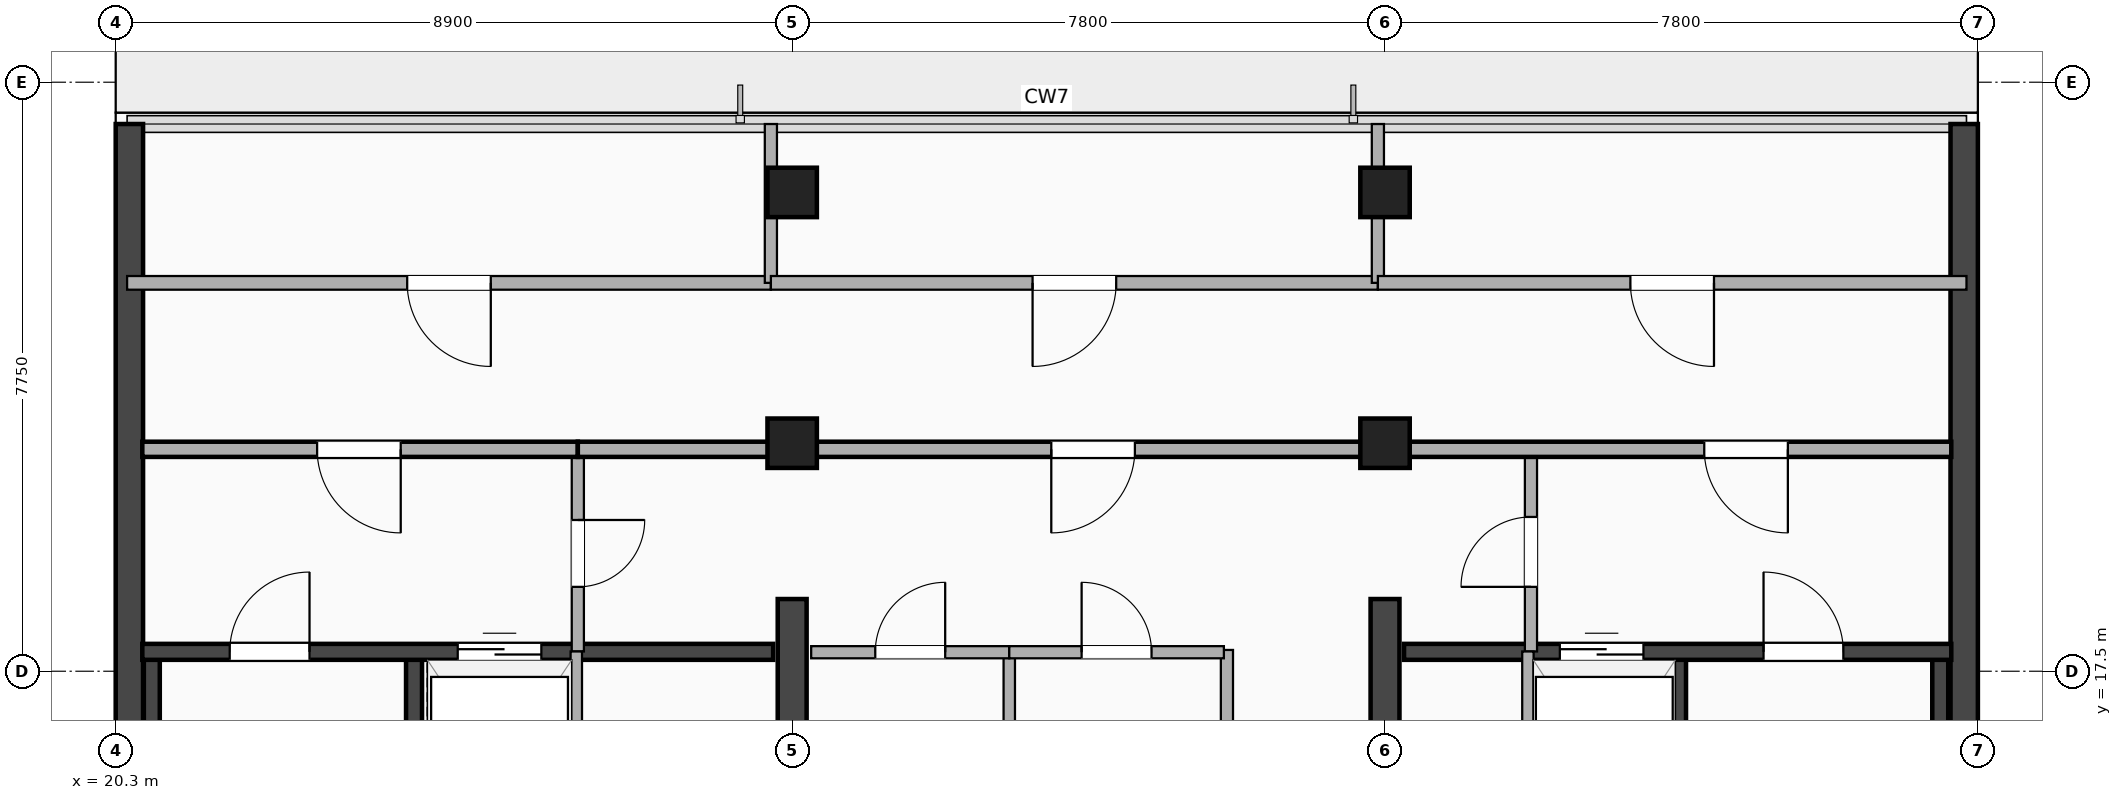
"""IFC4 building model, lengths in metres.
Left out: names, types, materials, properties, quantities, classifications, styles, units other than length and angle.
Written with IfcOpenShell. Run it as: python <this file> out.ifc"""

import sys

from ifc_helpers import new_model, si_unit, direction, frame, frame_2d, origin, origin_2d, place, context, subcontext, project, spatial, rectangle, extrude, element, fill, save


model = new_model("IFC4")
c1 = context("Model", 3, precision=1e-05, world=origin(), true_north=direction((0.0, 1.0)))
c2 = subcontext(c1, "Body", "Model", "MODEL_VIEW")
j1 = project(units=[si_unit("LENGTHUNIT", "METRE"), si_unit("PLANEANGLEUNIT", "RADIAN")], contexts=[c1])
p1 = place(None, origin())
s1 = spatial("IfcSite", under=j1, at=p1, CompositionType="ELEMENT")
p2 = place(p1, origin())
s2 = spatial("IfcBuilding", under=s1, at=p2, CompositionType="ELEMENT")
p3 = place(p2, frame((0.0, 0.0, 312.5)))
s3 = spatial("IfcBuildingStorey", under=s2, at=p3, CompositionType="ELEMENT", Elevation=312.5)
for number, where, z_axis, x_axis in (
    (1, (20.48, 3.5, 0.0), (0.0, 0.0, 1.0), (0.0, 1.0, 0.0)),
    (2, (44.62, 3.5, 0.0), (0.0, 0.0, 1.0), (0.0, 1.0, 0.0)),
):
    element("IfcWall", number, at=place(p3, frame(where, z_axis=z_axis, x_axis=x_axis)), inside=s3, PredefinedType="SHEAR", context=c2, shape_type="SweptSolid", body=[
        extrude(rectangle(XDim=21.2, YDim=0.36, at=frame_2d((10.6, 0.0))), origin(), (0.0, 0.0, 1.0), 4.3),
    ])
p4 = place(p3, frame((29.2, 3.5, 0.0), z_axis=(0.0, 0.0, 1.0), x_axis=(0.0, 1.0, 0.0)))
e3 = element("IfcWall", 3, at=p4, inside=s3, PredefinedType="SHEAR", context=c2, shape_type="SweptSolid", body=[
    extrude(rectangle(XDim=14.95, YDim=0.38, at=frame_2d((7.475, 0.0))), origin(), (0.0, 0.0, 1.0), 4.3),
])
p5 = place(p4, frame((7.75, 0.0, 0.0), z_axis=(0.0, 0.0, 1.0), x_axis=(-1.0, 0.0, 0.0)))
e4 = element("IfcOpeningElement", 4, at=p5, cuts=e3, PredefinedType="OPENING", context=c2, shape_type="SweptSolid", body=[
    extrude(rectangle(XDim=1.1, YDim=2.15, at=frame_2d((0.55, 1.075))), frame((0.0, 0.2, 0.0), z_axis=(0.0, -1.0, 0.0), x_axis=(1.0, 0.0, 0.0)), (0.0, 0.0, 1.0), 0.4),
])
p6 = place(p3, frame((37.0, 3.5, 0.0), z_axis=(0.0, 0.0, 1.0), x_axis=(0.0, 1.0, 0.0)))
e5 = element("IfcWall", 5, at=p6, inside=s3, PredefinedType="SHEAR", context=c2, shape_type="SweptSolid", body=[
    extrude(rectangle(XDim=14.95, YDim=0.38, at=frame_2d((7.475, 0.0))), origin(), (0.0, 0.0, 1.0), 4.3),
])
p7 = place(p6, frame((6.65, 0.0, 0.0)))
e6 = element("IfcOpeningElement", 6, at=p7, cuts=e5, PredefinedType="OPENING", context=c2, shape_type="SweptSolid", body=[
    extrude(rectangle(XDim=1.1, YDim=2.15, at=frame_2d((0.55, 1.075))), frame((0.0, 0.2, 0.0), z_axis=(0.0, -1.0, 0.0), x_axis=(1.0, 0.0, 0.0)), (0.0, 0.0, 1.0), 0.4),
])
for number, where, z_axis, x_axis in (
    (7, (20.775, 9.745, 0.0), (0.0, 0.0, 1.0), (0.0, 1.0, 0.0)),
    (8, (24.225, 9.745, 0.0), (0.0, 0.0, 1.0), (0.0, 1.0, 0.0)),
):
    element("IfcWall", number, at=place(p3, frame(where, z_axis=z_axis, x_axis=x_axis)), inside=s3, PredefinedType="SHEAR", context=c2, shape_type="SweptSolid", body=[
        extrude(rectangle(XDim=8.01, YDim=0.21, at=frame_2d((4.005, 0.0))), origin(), (0.0, 0.0, 1.0), 4.3),
    ])
p8 = place(p3, frame((20.65, 17.755, 0.0), z_axis=(0.0, 0.0, 1.0), x_axis=(1.0, 0.0, 0.0)))
e9 = element("IfcWall", 9, at=p8, inside=s3, PredefinedType="SHEAR", context=c2, shape_type="SweptSolid", body=[
    extrude(rectangle(XDim=8.3, YDim=0.21, at=frame_2d((4.15, 0.0))), origin(), (0.0, 0.0, 1.0), 4.3),
])
p9 = place(p8, frame((2.2, 0.0, 0.0), z_axis=(0.0, 0.0, 1.0), x_axis=(-1.0, 0.0, 0.0)))
e10 = element("IfcOpeningElement", 10, at=p9, cuts=e9, PredefinedType="OPENING", context=c2, shape_type="SweptSolid", body=[
    extrude(rectangle(XDim=1.05, YDim=2.15, at=frame_2d((0.525, 1.075))), frame((0.0, 0.115, 0.0), z_axis=(0.0, -1.0, 0.0), x_axis=(1.0, 0.0, 0.0)), (0.0, 0.0, 1.0), 0.23),
])
p10 = place(p8, frame((4.15, 0.0, 0.0)))
e11 = element("IfcOpeningElement", 11, at=p10, cuts=e9, PredefinedType="OPENING", context=c2, shape_type="SweptSolid", body=[
    extrude(rectangle(XDim=1.1, YDim=2.18, at=frame_2d((0.55, 1.09))), frame((0.0, 0.115, 0.0), z_axis=(0.0, -1.0, 0.0), x_axis=(1.0, 0.0, 0.0)), (0.0, 0.0, 1.0), 0.23),
])
for number, where, z_axis, x_axis in (
    (12, (40.855, 9.745, 0.0), (0.0, 0.0, 1.0), (0.0, 1.0, 0.0)),
    (13, (44.305, 9.745, 0.0), (0.0, 0.0, 1.0), (0.0, 1.0, 0.0)),
):
    element("IfcWall", number, at=place(p3, frame(where, z_axis=z_axis, x_axis=x_axis)), inside=s3, PredefinedType="SHEAR", context=c2, shape_type="SweptSolid", body=[
        extrude(rectangle(XDim=8.01, YDim=0.21, at=frame_2d((4.005, 0.0))), origin(), (0.0, 0.0, 1.0), 4.3),
    ])
p11 = place(p3, frame((37.25, 17.755, 0.0), z_axis=(0.0, 0.0, 1.0), x_axis=(1.0, 0.0, 0.0)))
e14 = element("IfcWall", 14, at=p11, inside=s3, PredefinedType="SHEAR", context=c2, shape_type="SweptSolid", body=[
    extrude(rectangle(XDim=7.2, YDim=0.21, at=frame_2d((3.6, 0.0))), origin(), (0.0, 0.0, 1.0), 4.3),
])
p12 = place(p11, frame((2.05, 0.0, 0.0)))
e15 = element("IfcOpeningElement", 15, at=p12, cuts=e14, PredefinedType="OPENING", context=c2, shape_type="SweptSolid", body=[
    extrude(rectangle(XDim=1.1, YDim=2.18, at=frame_2d((0.55, 1.09))), frame((0.0, 0.115, 0.0), z_axis=(0.0, -1.0, 0.0), x_axis=(1.0, 0.0, 0.0)), (0.0, 0.0, 1.0), 0.23),
])
p13 = place(p11, frame((5.78, 0.0, 0.0), z_axis=(0.0, 0.0, 1.0), x_axis=(-1.0, 0.0, 0.0)))
e16 = element("IfcOpeningElement", 16, at=p13, cuts=e14, PredefinedType="OPENING", context=c2, shape_type="SweptSolid", body=[
    extrude(rectangle(XDim=1.05, YDim=2.15, at=frame_2d((0.525, 1.075))), frame((0.0, 0.115, 0.0), z_axis=(0.0, -1.0, 0.0), x_axis=(1.0, 0.0, 0.0)), (0.0, 0.0, 1.0), 0.23),
])
for number, where, z_axis, x_axis in (
    (17, (29.2, 20.5, -0.3), (0.0, 0.0, 1.0), (1.0, 0.0, 0.0)),
    (18, (37.0, 20.5, -0.3), (0.0, 0.0, 1.0), (1.0, 0.0, 0.0)),
    (19, (29.2, 23.8, -0.3), (0.0, 0.0, 1.0), (1.0, 0.0, 0.0)),
    (20, (37.0, 23.8, -0.3), (0.0, 0.0, 1.0), (1.0, 0.0, 0.0)),
):
    element("IfcColumn", number, at=place(p3, frame(where, z_axis=z_axis, x_axis=x_axis)), inside=s3, PredefinedType="COLUMN", context=c2, shape_type="SweptSolid", body=[
        extrude(rectangle(XDim=0.65, YDim=0.65, at=origin_2d()), origin(), (0.0, 0.0, 1.0), 4.6),
    ])
p14 = place(p3, frame((26.38, 17.76, 0.0), z_axis=(0.0, 0.0, 1.0), x_axis=(0.0, 1.0, 0.0)))
e21 = element("IfcWall", 21, at=p14, inside=s3, PredefinedType="PARTITIONING", context=c2, shape_type="SweptSolid", body=[
    extrude(rectangle(XDim=2.66, YDim=0.16, at=frame_2d((1.33, 0.0))), origin(), (0.0, 0.0, 1.0), 4.3),
])
p15 = place(p14, frame((0.85, 0.0, 0.0)))
e22 = element("IfcOpeningElement", 22, at=p15, cuts=e21, PredefinedType="OPENING", context=c2, shape_type="SweptSolid", body=[
    extrude(rectangle(XDim=0.88, YDim=2.08, at=frame_2d((0.44, 1.04))), frame((0.0, 0.09, 0.0), z_axis=(0.0, -1.0, 0.0), x_axis=(1.0, 0.0, 0.0)), (0.0, 0.0, 1.0), 0.18),
])
p16 = place(p3, frame((38.92, 17.76, 0.0), z_axis=(0.0, 0.0, 1.0), x_axis=(0.0, 1.0, 0.0)))
e23 = element("IfcWall", 23, at=p16, inside=s3, PredefinedType="PARTITIONING", context=c2, shape_type="SweptSolid", body=[
    extrude(rectangle(XDim=2.66, YDim=0.16, at=frame_2d((1.33, 0.0))), origin(), (0.0, 0.0, 1.0), 4.3),
])
p17 = place(p16, frame((1.77, 0.0, 0.0), z_axis=(0.0, 0.0, 1.0), x_axis=(-1.0, 0.0, 0.0)))
e24 = element("IfcOpeningElement", 24, at=p17, cuts=e23, PredefinedType="OPENING", context=c2, shape_type="SweptSolid", body=[
    extrude(rectangle(XDim=0.92, YDim=2.08, at=frame_2d((0.46, 1.04))), frame((0.0, 0.09, 0.0), z_axis=(0.0, -1.0, 0.0), x_axis=(1.0, 0.0, 0.0)), (0.0, 0.0, 1.0), 0.18),
])
for number, where, z_axis, x_axis in (
    (25, (26.36, 14.72, 0.0), (0.0, 0.0, 1.0), (0.0, 1.0, 0.0)),
    (26, (38.88, 14.72, 0.0), (0.0, 0.0, 1.0), (0.0, 1.0, 0.0)),
):
    element("IfcWall", number, at=place(p3, frame(where, z_axis=z_axis, x_axis=x_axis)), inside=s3, PredefinedType="PARTITIONING", context=c2, shape_type="SweptSolid", body=[
        extrude(rectangle(XDim=3.04, YDim=0.15, at=frame_2d((1.52, 0.0))), origin(), (0.0, 0.0, 1.0), 4.3),
    ])
p18 = place(p3, frame((20.65, 20.42, 0.0), z_axis=(0.0, 0.0, 1.0), x_axis=(1.0, 0.0, 0.0)))
e27 = element("IfcWall", 27, at=p18, inside=s3, PredefinedType="PARTITIONING", context=c2, shape_type="SweptSolid", body=[
    extrude(rectangle(XDim=5.73, YDim=0.2, at=frame_2d((2.865, 0.0))), origin(), (0.0, 0.0, 1.0), 4.3),
])
p19 = place(p18, frame((2.3, 0.0, 0.0)))
e28 = element("IfcOpeningElement", 28, at=p19, cuts=e27, PredefinedType="OPENING", context=c2, shape_type="SweptSolid", body=[
    extrude(rectangle(XDim=1.1, YDim=2.15, at=frame_2d((0.55, 1.075))), frame((0.0, 0.11, 0.0), z_axis=(0.0, -1.0, 0.0), x_axis=(1.0, 0.0, 0.0)), (0.0, 0.0, 1.0), 0.22),
])
p20 = place(p3, frame((26.38, 20.42, 0.0), z_axis=(0.0, 0.0, 1.0), x_axis=(1.0, 0.0, 0.0)))
e29 = element("IfcWall", 29, at=p20, inside=s3, PredefinedType="PARTITIONING", context=c2, shape_type="SweptSolid", body=[
    extrude(rectangle(XDim=2.82, YDim=0.2, at=frame_2d((1.41, 0.0))), origin(), (0.0, 0.0, 1.0), 3.885),
])
p21 = place(p3, frame((29.2, 20.42, 0.0), z_axis=(0.0, 0.0, 1.0), x_axis=(1.0, 0.0, 0.0)))
e30 = element("IfcWall", 30, at=p21, inside=s3, PredefinedType="PARTITIONING", context=c2, shape_type="SweptSolid", body=[
    extrude(rectangle(XDim=7.8, YDim=0.2, at=frame_2d((3.9, 0.0))), origin(), (0.0, 0.0, 1.0), 3.885),
])
p22 = place(p21, frame((3.409, 0.0, 0.0)))
e31 = element("IfcOpeningElement", 31, at=p22, cuts=e30, PredefinedType="OPENING", context=c2, shape_type="SweptSolid", body=[
    extrude(rectangle(XDim=1.1, YDim=2.15, at=frame_2d((0.55, 1.075))), frame((0.0, 0.11, 0.0), z_axis=(0.0, -1.0, 0.0), x_axis=(1.0, 0.0, 0.0)), (0.0, 0.0, 1.0), 0.22),
])
p23 = place(p3, frame((37.0, 20.42, 0.0), z_axis=(0.0, 0.0, 1.0), x_axis=(1.0, 0.0, 0.0)))
e32 = element("IfcWall", 32, at=p23, inside=s3, PredefinedType="PARTITIONING", context=c2, shape_type="SweptSolid", body=[
    extrude(rectangle(XDim=7.45, YDim=0.2, at=frame_2d((3.725, 0.0))), origin(), (0.0, 0.0, 1.0), 3.885),
])
p24 = place(p23, frame((4.2, 0.0, 0.0)))
e33 = element("IfcOpeningElement", 33, at=p24, cuts=e32, PredefinedType="OPENING", context=c2, shape_type="SweptSolid", body=[
    extrude(rectangle(XDim=1.1, YDim=2.15, at=frame_2d((0.55, 1.075))), frame((0.0, 0.11, 0.0), z_axis=(0.0, -1.0, 0.0), x_axis=(1.0, 0.0, 0.0)), (0.0, 0.0, 1.0), 0.22),
])
p25 = place(p3, frame((34.92, 11.68, 0.0), z_axis=(0.0, 0.0, 1.0), x_axis=(0.0, 1.0, 0.0)))
e34 = element("IfcWall", 34, at=p25, inside=s3, PredefinedType="PARTITIONING", context=c2, shape_type="SweptSolid", body=[
    extrude(rectangle(XDim=6.1, YDim=0.16, at=frame_2d((3.05, 0.0))), origin(), (0.0, 0.0, 1.0), 4.3),
])
p26 = place(p3, frame((32.056, 11.74, 0.0), z_axis=(0.0, 0.0, 1.0), x_axis=(0.0, 1.0, 0.0)))
e35 = element("IfcWall", 35, at=p26, inside=s3, PredefinedType="PARTITIONING", context=c2, shape_type="SweptSolid", body=[
    extrude(rectangle(XDim=6.01, YDim=0.15, at=frame_2d((3.005, 0.0))), origin(), (0.0, 0.0, 1.0), 4.3),
])
p27 = place(p3, frame((29.45, 17.75, 0.0), z_axis=(0.0, 0.0, 1.0), x_axis=(1.0, 0.0, 0.0)))
e36 = element("IfcWall", 36, at=p27, inside=s3, PredefinedType="PARTITIONING", context=c2, shape_type="SweptSolid", body=[
    extrude(rectangle(XDim=2.606, YDim=0.16, at=frame_2d((1.303, 0.0))), origin(), (0.0, 0.0, 1.0), 4.3),
])
p28 = place(p27, frame((1.763, 0.0, 0.0), z_axis=(0.0, 0.0, 1.0), x_axis=(-1.0, 0.0, 0.0)))
e37 = element("IfcOpeningElement", 37, at=p28, cuts=e36, PredefinedType="OPENING", context=c2, shape_type="SweptSolid", body=[
    extrude(rectangle(XDim=0.92, YDim=2.08, at=frame_2d((0.46, 1.04))), frame((0.0, 0.09, 0.0), z_axis=(0.0, -1.0, 0.0), x_axis=(1.0, 0.0, 0.0)), (0.0, 0.0, 1.0), 0.18),
])
p29 = place(p3, frame((32.056, 17.75, 0.0), z_axis=(0.0, 0.0, 1.0), x_axis=(1.0, 0.0, 0.0)))
e38 = element("IfcWall", 38, at=p29, inside=s3, PredefinedType="PARTITIONING", context=c2, shape_type="SweptSolid", body=[
    extrude(rectangle(XDim=2.823, YDim=0.16, at=frame_2d((1.412, 0.0))), origin(), (0.0, 0.0, 1.0), 4.3),
])
p30 = place(p29, frame((1.872, 0.0, 0.0), z_axis=(0.0, 0.0, 1.0), x_axis=(-1.0, 0.0, 0.0)))
e39 = element("IfcOpeningElement", 39, at=p30, cuts=e38, PredefinedType="OPENING", context=c2, shape_type="SweptSolid", body=[
    extrude(rectangle(XDim=0.92, YDim=2.08, at=frame_2d((0.46, 1.04))), frame((0.0, 0.09, 0.0), z_axis=(0.0, -1.0, 0.0), x_axis=(1.0, 0.0, 0.0)), (0.0, 0.0, 1.0), 0.18),
])
p31 = place(p3, frame((20.45, 22.61, 0.0), z_axis=(0.0, 0.0, 1.0), x_axis=(1.0, 0.0, 0.0)))
e40 = element("IfcWall", 40, at=p31, inside=s3, PredefinedType="PARTITIONING", context=c2, shape_type="SweptSolid", body=[
    extrude(rectangle(XDim=8.47, YDim=0.18, at=frame_2d((4.235, 0.0))), origin(), (0.0, 0.0, 1.0), 4.3),
])
p32 = place(p31, frame((3.685, 0.0, 0.0)))
e41 = element("IfcOpeningElement", 41, at=p32, cuts=e40, PredefinedType="OPENING", context=c2, shape_type="SweptSolid", body=[
    extrude(rectangle(XDim=1.1, YDim=2.15, at=frame_2d((0.55, 1.075))), frame((0.0, 0.1, 0.0), z_axis=(0.0, -1.0, 0.0), x_axis=(1.0, 0.0, 0.0)), (0.0, 0.0, 1.0), 0.2),
])
p33 = place(p3, frame((28.92, 22.61, 0.0), z_axis=(0.0, 0.0, 1.0), x_axis=(0.0, 1.0, 0.0)))
e42 = element("IfcWall", 42, at=p33, inside=s3, PredefinedType="PARTITIONING", context=c2, shape_type="SweptSolid", body=[
    extrude(rectangle(XDim=2.09, YDim=0.16, at=frame_2d((1.045, 0.0))), origin(), (0.0, 0.0, 1.0), 3.885),
])
p34 = place(p3, frame((28.92, 22.61, 0.0), z_axis=(0.0, 0.0, 1.0), x_axis=(1.0, 0.0, 0.0)))
e43 = element("IfcWall", 43, at=p34, inside=s3, PredefinedType="PARTITIONING", context=c2, shape_type="SweptSolid", body=[
    extrude(rectangle(XDim=7.986, YDim=0.18, at=frame_2d((3.993, 0.0))), origin(), (0.0, 0.0, 1.0), 3.885),
])
p35 = place(p34, frame((3.443, 0.0, 0.0)))
e44 = element("IfcOpeningElement", 44, at=p35, cuts=e43, PredefinedType="OPENING", context=c2, shape_type="SweptSolid", body=[
    extrude(rectangle(XDim=1.1, YDim=2.15, at=frame_2d((0.55, 1.075))), frame((0.0, 0.1, 0.0), z_axis=(0.0, -1.0, 0.0), x_axis=(1.0, 0.0, 0.0)), (0.0, 0.0, 1.0), 0.2),
])
p36 = place(p3, frame((36.906, 22.61, 0.0), z_axis=(0.0, 0.0, 1.0), x_axis=(0.0, 1.0, 0.0)))
e45 = element("IfcWall", 45, at=p36, inside=s3, PredefinedType="PARTITIONING", context=c2, shape_type="SweptSolid", body=[
    extrude(rectangle(XDim=2.09, YDim=0.16, at=frame_2d((1.045, 0.0))), origin(), (0.0, 0.0, 1.0), 3.885),
])
p37 = place(p3, frame((36.906, 22.61, 0.0), z_axis=(0.0, 0.0, 1.0), x_axis=(1.0, 0.0, 0.0)))
e46 = element("IfcWall", 46, at=p37, inside=s3, PredefinedType="PARTITIONING", context=c2, shape_type="SweptSolid", body=[
    extrude(rectangle(XDim=7.744, YDim=0.18, at=frame_2d((3.872, 0.0))), origin(), (0.0, 0.0, 1.0), 3.885),
])
p38 = place(p37, frame((3.322, 0.0, 0.0)))
e47 = element("IfcOpeningElement", 47, at=p38, cuts=e46, PredefinedType="OPENING", context=c2, shape_type="SweptSolid", body=[
    extrude(rectangle(XDim=1.1, YDim=2.15, at=frame_2d((0.55, 1.075))), frame((0.0, 0.1, 0.0), z_axis=(0.0, -1.0, 0.0), x_axis=(1.0, 0.0, 0.0)), (0.0, 0.0, 1.0), 0.2),
])
p39 = place(p9, origin())
e48 = element("IfcDoor", 48, at=p39, inside=s3, OperationType="SINGLE_SWING_RIGHT", PredefinedType="DOOR", context=c2, shape_type="SweptSolid", body=[
    extrude(rectangle(XDim=1.05, YDim=2.15, at=frame_2d((0.525, 1.075))), frame((0.0, 0.025, 0.0), z_axis=(0.0, -1.0, 0.0), x_axis=(1.0, 0.0, 0.0)), (0.0, 0.0, 1.0), 0.05),
])
fill(e10, e48)
p40 = place(p10, origin())
e49 = element("IfcDoor", 49, at=p40, inside=s3, OperationType="DOUBLE_DOOR_SLIDING", PredefinedType="DOOR", context=c2, shape_type="SweptSolid", body=[
    extrude(rectangle(XDim=1.1, YDim=2.18, at=frame_2d((0.55, 1.09))), frame((0.0, 0.025, 0.0), z_axis=(0.0, -1.0, 0.0), x_axis=(1.0, 0.0, 0.0)), (0.0, 0.0, 1.0), 0.05),
])
fill(e11, e49)
p41 = place(p12, origin())
e50 = element("IfcDoor", 50, at=p41, inside=s3, OperationType="DOUBLE_DOOR_SLIDING", PredefinedType="DOOR", context=c2, shape_type="SweptSolid", body=[
    extrude(rectangle(XDim=1.1, YDim=2.18, at=frame_2d((0.55, 1.09))), frame((0.0, 0.025, 0.0), z_axis=(0.0, -1.0, 0.0), x_axis=(1.0, 0.0, 0.0)), (0.0, 0.0, 1.0), 0.05),
])
fill(e15, e50)
p42 = place(p13, origin())
e51 = element("IfcDoor", 51, at=p42, inside=s3, OperationType="SINGLE_SWING_LEFT", PredefinedType="DOOR", context=c2, shape_type="SweptSolid", body=[
    extrude(rectangle(XDim=1.05, YDim=2.15, at=frame_2d((0.525, 1.075))), frame((0.0, 0.025, 0.0), z_axis=(0.0, -1.0, 0.0), x_axis=(1.0, 0.0, 0.0)), (0.0, 0.0, 1.0), 0.05),
])
fill(e16, e51)
p43 = place(p15, origin())
e52 = element("IfcDoor", 52, at=p43, inside=s3, OperationType="SINGLE_SWING_RIGHT", PredefinedType="DOOR", context=c2, shape_type="SweptSolid", body=[
    extrude(rectangle(XDim=0.88, YDim=2.08, at=frame_2d((0.44, 1.04))), frame((0.0, 0.025, 0.0), z_axis=(0.0, -1.0, 0.0), x_axis=(1.0, 0.0, 0.0)), (0.0, 0.0, 1.0), 0.05),
])
fill(e22, e52)
p44 = place(p17, origin())
e53 = element("IfcDoor", 53, at=p44, inside=s3, OperationType="SINGLE_SWING_LEFT", PredefinedType="DOOR", context=c2, shape_type="SweptSolid", body=[
    extrude(rectangle(XDim=0.92, YDim=2.08, at=frame_2d((0.46, 1.04))), frame((0.0, 0.025, 0.0), z_axis=(0.0, -1.0, 0.0), x_axis=(1.0, 0.0, 0.0)), (0.0, 0.0, 1.0), 0.05),
])
fill(e24, e53)
p45 = place(p19, origin())
e54 = element("IfcDoor", 54, at=p45, inside=s3, OperationType="SINGLE_SWING_RIGHT", PredefinedType="DOOR", context=c2, shape_type="SweptSolid", body=[
    extrude(rectangle(XDim=1.1, YDim=2.15, at=frame_2d((0.55, 1.075))), frame((0.0, 0.025, 0.0), z_axis=(0.0, -1.0, 0.0), x_axis=(1.0, 0.0, 0.0)), (0.0, 0.0, 1.0), 0.05),
])
fill(e28, e54)
p46 = place(p22, origin())
e55 = element("IfcDoor", 55, at=p46, inside=s3, OperationType="SINGLE_SWING_LEFT", PredefinedType="DOOR", context=c2, shape_type="SweptSolid", body=[
    extrude(rectangle(XDim=1.1, YDim=2.15, at=frame_2d((0.55, 1.075))), frame((0.0, 0.025, 0.0), z_axis=(0.0, -1.0, 0.0), x_axis=(1.0, 0.0, 0.0)), (0.0, 0.0, 1.0), 0.05),
])
fill(e31, e55)
p47 = place(p24, origin())
e56 = element("IfcDoor", 56, at=p47, inside=s3, OperationType="SINGLE_SWING_RIGHT", PredefinedType="DOOR", context=c2, shape_type="SweptSolid", body=[
    extrude(rectangle(XDim=1.1, YDim=2.15, at=frame_2d((0.55, 1.075))), frame((0.0, 0.025, 0.0), z_axis=(0.0, -1.0, 0.0), x_axis=(1.0, 0.0, 0.0)), (0.0, 0.0, 1.0), 0.05),
])
fill(e33, e56)
p48 = place(p28, origin())
e57 = element("IfcDoor", 57, at=p48, inside=s3, OperationType="SINGLE_SWING_RIGHT", PredefinedType="DOOR", context=c2, shape_type="SweptSolid", body=[
    extrude(rectangle(XDim=0.92, YDim=2.08, at=frame_2d((0.46, 1.04))), frame((0.0, 0.025, 0.0), z_axis=(0.0, -1.0, 0.0), x_axis=(1.0, 0.0, 0.0)), (0.0, 0.0, 1.0), 0.05),
])
fill(e37, e57)
p49 = place(p30, origin())
e58 = element("IfcDoor", 58, at=p49, inside=s3, OperationType="SINGLE_SWING_LEFT", PredefinedType="DOOR", context=c2, shape_type="SweptSolid", body=[
    extrude(rectangle(XDim=0.92, YDim=2.08, at=frame_2d((0.46, 1.04))), frame((0.0, 0.025, 0.0), z_axis=(0.0, -1.0, 0.0), x_axis=(1.0, 0.0, 0.0)), (0.0, 0.0, 1.0), 0.05),
])
fill(e39, e58)
p50 = place(p32, origin())
e59 = element("IfcDoor", 59, at=p50, inside=s3, OperationType="SINGLE_SWING_RIGHT", PredefinedType="DOOR", context=c2, shape_type="SweptSolid", body=[
    extrude(rectangle(XDim=1.1, YDim=2.15, at=frame_2d((0.55, 1.075))), frame((0.0, 0.025, 0.0), z_axis=(0.0, -1.0, 0.0), x_axis=(1.0, 0.0, 0.0)), (0.0, 0.0, 1.0), 0.05),
])
fill(e41, e59)
p51 = place(p35, origin())
e60 = element("IfcDoor", 60, at=p51, inside=s3, OperationType="SINGLE_SWING_LEFT", PredefinedType="DOOR", context=c2, shape_type="SweptSolid", body=[
    extrude(rectangle(XDim=1.1, YDim=2.15, at=frame_2d((0.55, 1.075))), frame((0.0, 0.025, 0.0), z_axis=(0.0, -1.0, 0.0), x_axis=(1.0, 0.0, 0.0)), (0.0, 0.0, 1.0), 0.05),
])
fill(e44, e60)
p52 = place(p38, origin())
e61 = element("IfcDoor", 61, at=p52, inside=s3, OperationType="SINGLE_SWING_RIGHT", PredefinedType="DOOR", context=c2, shape_type="SweptSolid", body=[
    extrude(rectangle(XDim=1.1, YDim=2.15, at=frame_2d((0.55, 1.075))), frame((0.0, 0.025, 0.0), z_axis=(0.0, -1.0, 0.0), x_axis=(1.0, 0.0, 0.0)), (0.0, 0.0, 1.0), 0.05),
])
fill(e47, e61)
save(model, sys.argv[1])
